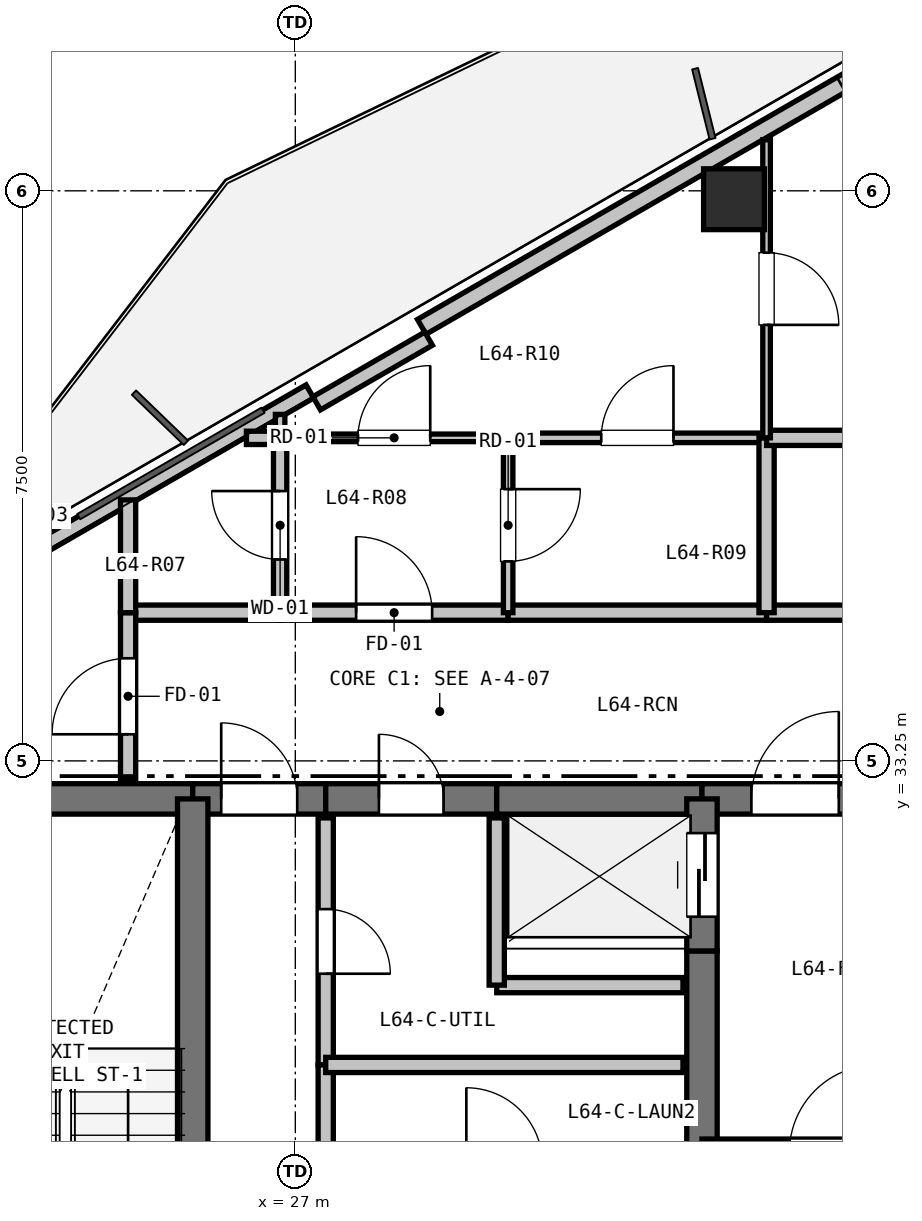
"""IFC4 building model, lengths in metres.
Left out: names, types, materials, properties, quantities, classifications, styles, units other than length and angle.
Written with IfcOpenShell. Run it as: python <this file> out.ifc"""

import sys

from ifc_helpers import new_model, si_unit, direction, frame, frame_2d, origin, origin_2d, place, context, subcontext, project, spatial, rectangle, hollow_rectangle, extrude, element, fill, save


model = new_model("IFC4")
c1 = context("Model", 3, precision=1e-05, world=origin(), true_north=direction((0.0, 1.0)))
c2 = subcontext(c1, "Body", "Model", "MODEL_VIEW")
j1 = project(units=[si_unit("LENGTHUNIT", "METRE"), si_unit("PLANEANGLEUNIT", "RADIAN")], contexts=[c1])
p1 = place(None, origin())
s1 = spatial("IfcSite", under=j1, at=p1, CompositionType="ELEMENT")
p2 = place(p1, origin())
s2 = spatial("IfcBuilding", under=s1, at=p2, CompositionType="ELEMENT")
p3 = place(p2, frame((0.0, 0.0, 229.8)))
s3 = spatial("IfcBuildingStorey", under=s2, at=p3, CompositionType="ELEMENT", Elevation=229.8)
p4 = place(p3, frame((32.771, 40.639, 0.0), z_axis=(0.0, 0.0, 1.0), x_axis=(1.0, 0.0, 0.0)))
e1 = element("IfcColumn", 1, at=p4, inside=s3, PredefinedType="COLUMN", context=c2, shape_type="SweptSolid", body=[
    extrude(hollow_rectangle(XDim=0.8, YDim=0.8, WallThickness=0.025, at=origin_2d()), origin(), (0.0, 0.0, 1.0), 3.3),
])
p5 = place(p3, frame((20.066, 33.997, 0.0), z_axis=(0.0, 0.0, 1.0), x_axis=(0.866019557082, 0.500010126649, 0.0)))
e2 = element("IfcWall", 2, at=p5, inside=s3, PredefinedType="PARAPET", context=c2, shape_type="SweptSolid", body=[
    extrude(rectangle(XDim=8.228, YDim=0.2, at=frame_2d((4.114, 0.0))), origin(), (0.0, 0.0, 1.0), 0.2),
])
p6 = place(p3, frame((28.664, 38.96, 0.0), z_axis=(0.0, 0.0, 1.0), x_axis=(0.866026655105, 0.499997832642, 0.0)))
e3 = element("IfcWall", 3, at=p6, inside=s3, PredefinedType="SOLIDWALL", context=c2, shape_type="SweptSolid", body=[
    extrude(rectangle(XDim=8.928, YDim=0.225, at=frame_2d((4.464, 0.0))), origin(), (0.0, 0.0, 1.0), 2.7),
])
p7 = place(p6, frame((6.372, 0.0, 0.9)))
e4 = element("IfcOpeningElement", 4, at=p7, cuts=e3, PredefinedType="OPENING", context=c2, shape_type="SweptSolid", body=[
    extrude(rectangle(XDim=1.2, YDim=1.4, at=frame_2d((0.6, 0.7))), frame((0.0, 0.123, 0.0), z_axis=(0.0, -1.0, 0.0), x_axis=(1.0, 0.0, 0.0)), (0.0, 0.0, 1.0), 0.245),
])
p8 = place(p3, frame((27.281, 37.955, 0.0), z_axis=(0.0, 0.0, 1.0), x_axis=(0.866025371046, 0.500000056704, 0.0)))
e5 = element("IfcWall", 5, at=p8, inside=s3, PredefinedType="PARAPET", context=c2, shape_type="SweptSolid", body=[
    extrude(rectangle(XDim=1.7, YDim=0.2, at=frame_2d((0.85, 0.0))), origin(), (0.0, 0.0, 1.0), 2.7),
])
p9 = place(p3, frame((22.2, 32.75, 0.0), z_axis=(0.0, 0.0, 1.0), x_axis=(1.0, 0.0, 0.0)))
e6 = element("IfcWall", 6, at=p9, inside=s3, PredefinedType="SHEAR", context=c2, shape_type="SweptSolid", body=[
    extrude(rectangle(XDim=3.45, YDim=0.4, at=frame_2d((1.725, 0.0))), origin(), (0.0, 0.0, 1.0), 3.08),
])
p10 = place(p3, frame((25.65, 32.75, 0.0), z_axis=(0.0, 0.0, 1.0), x_axis=(1.0, 0.0, 0.0)))
e7 = element("IfcWall", 7, at=p10, inside=s3, PredefinedType="SHEAR", context=c2, shape_type="SweptSolid", body=[
    extrude(rectangle(XDim=1.75, YDim=0.4, at=frame_2d((0.875, 0.0))), origin(), (0.0, 0.0, 1.0), 3.08),
])
p11 = place(p10, frame((0.375, 0.0, 0.0)))
e8 = element("IfcOpeningElement", 8, at=p11, cuts=e7, PredefinedType="OPENING", context=c2, shape_type="SweptSolid", body=[
    extrude(rectangle(XDim=1.0, YDim=2.15, at=frame_2d((0.5, 1.075))), frame((0.0, 0.21, 0.0), z_axis=(0.0, -1.0, 0.0), x_axis=(1.0, 0.0, 0.0)), (0.0, 0.0, 1.0), 0.42),
])
p12 = place(p3, frame((27.4, 32.75, 0.0), z_axis=(0.0, 0.0, 1.0), x_axis=(1.0, 0.0, 0.0)))
e9 = element("IfcWall", 9, at=p12, inside=s3, PredefinedType="SHEAR", context=c2, shape_type="SweptSolid", body=[
    extrude(rectangle(XDim=2.25, YDim=0.4, at=frame_2d((1.125, 0.0))), origin(), (0.0, 0.0, 1.0), 3.08),
])
p13 = place(p12, frame((0.7, 0.0, 0.0)))
e10 = element("IfcOpeningElement", 10, at=p13, cuts=e9, PredefinedType="OPENING", context=c2, shape_type="SweptSolid", body=[
    extrude(rectangle(XDim=0.85, YDim=2.1, at=frame_2d((0.425, 1.05))), frame((0.0, 0.21, 0.0), z_axis=(0.0, -1.0, 0.0), x_axis=(1.0, 0.0, 0.0)), (0.0, 0.0, 1.0), 0.42),
])
p14 = place(p3, frame((29.65, 32.75, 0.0), z_axis=(0.0, 0.0, 1.0), x_axis=(1.0, 0.0, 0.0)))
e11 = element("IfcWall", 11, at=p14, inside=s3, PredefinedType="SHEAR", context=c2, shape_type="SweptSolid", body=[
    extrude(rectangle(XDim=2.7, YDim=0.4, at=frame_2d((1.35, 0.0))), origin(), (0.0, 0.0, 1.0), 3.08),
])
p15 = place(p3, frame((32.35, 32.75, 0.0), z_axis=(0.0, 0.0, 1.0), x_axis=(1.0, 0.0, 0.0)))
e12 = element("IfcWall", 12, at=p15, inside=s3, PredefinedType="SHEAR", context=c2, shape_type="SweptSolid", body=[
    extrude(rectangle(XDim=3.45, YDim=0.4, at=frame_2d((1.725, 0.0))), origin(), (0.0, 0.0, 1.0), 3.08),
])
p16 = place(p15, frame((0.65, 0.0, 0.0)))
e13 = element("IfcOpeningElement", 13, at=p16, cuts=e12, PredefinedType="OPENING", context=c2, shape_type="SweptSolid", body=[
    extrude(rectangle(XDim=1.15, YDim=2.15, at=frame_2d((0.575, 1.075))), frame((0.0, 0.21, 0.0), z_axis=(0.0, -1.0, 0.0), x_axis=(1.0, 0.0, 0.0)), (0.0, 0.0, 1.0), 0.42),
])
p17 = place(p3, frame((25.65, 27.95, 0.0), z_axis=(0.0, 0.0, 1.0), x_axis=(0.0, 1.0, 0.0)))
e14 = element("IfcWall", 14, at=p17, inside=s3, PredefinedType="SHEAR", context=c2, shape_type="SweptSolid", body=[
    extrude(rectangle(XDim=4.8, YDim=0.4, at=frame_2d((2.4, 0.0))), origin(), (0.0, 0.0, 1.0), 3.08),
])
p18 = place(p3, frame((32.35, 27.95, 0.0), z_axis=(0.0, 0.0, 1.0), x_axis=(0.0, 1.0, 0.0)))
e15 = element("IfcWall", 15, at=p18, inside=s3, PredefinedType="SHEAR", context=c2, shape_type="SweptSolid", body=[
    extrude(rectangle(XDim=2.8, YDim=0.4, at=frame_2d((1.4, 0.0))), origin(), (0.0, 0.0, 1.0), 3.08),
])
p19 = place(p3, frame((32.35, 30.75, 0.0), z_axis=(0.0, 0.0, 1.0), x_axis=(0.0, 1.0, 0.0)))
e16 = element("IfcWall", 16, at=p19, inside=s3, PredefinedType="SHEAR", context=c2, shape_type="SweptSolid", body=[
    extrude(rectangle(XDim=2.0, YDim=0.4, at=frame_2d((1.0, 0.0))), origin(), (0.0, 0.0, 1.0), 3.08),
])
p20 = place(p19, frame((0.45, 0.0, 0.0)))
e17 = element("IfcOpeningElement", 17, at=p20, cuts=e16, PredefinedType="OPENING", context=c2, shape_type="SweptSolid", body=[
    extrude(rectangle(XDim=1.1, YDim=2.15, at=frame_2d((0.55, 1.075))), frame((0.0, 0.21, 0.0), z_axis=(0.0, -1.0, 0.0), x_axis=(1.0, 0.0, 0.0)), (0.0, 0.0, 1.0), 0.42),
])
p21 = place(p3, frame((32.35, 28.1, 0.0), z_axis=(0.0, 0.0, 1.0), x_axis=(1.0, 0.0, 0.0)))
e18 = element("IfcWall", 18, at=p21, inside=s3, PredefinedType="SHEAR", context=c2, shape_type="SweptSolid", body=[
    extrude(rectangle(XDim=3.45, YDim=0.35, at=frame_2d((1.725, 0.0))), origin(), (0.0, 0.0, 1.0), 3.08),
])
p22 = place(p21, frame((1.15, 0.0, 0.0)))
e19 = element("IfcOpeningElement", 19, at=p22, cuts=e18, PredefinedType="OPENING", context=c2, shape_type="SweptSolid", body=[
    extrude(rectangle(XDim=1.15, YDim=2.15, at=frame_2d((0.575, 1.075))), frame((0.0, 0.185, 0.0), z_axis=(0.0, -1.0, 0.0), x_axis=(1.0, 0.0, 0.0)), (0.0, 0.0, 1.0), 0.37),
])
p23 = place(p3, frame((32.1, 30.3, 0.0), z_axis=(0.0, 0.0, 1.0), x_axis=(-1.0, 0.0, 0.0)))
e20 = element("IfcWall", 20, at=p23, inside=s3, PredefinedType="PARTITIONING", context=c2, shape_type="SweptSolid", body=[
    extrude(rectangle(XDim=2.45, YDim=0.2, at=frame_2d((1.225, 0.0))), origin(), (0.0, 0.0, 1.0), 3.08),
])
p24 = place(p3, frame((29.65, 30.3, 0.0), z_axis=(0.0, 0.0, 1.0), x_axis=(0.0, 1.0, 0.0)))
e21 = element("IfcWall", 21, at=p24, inside=s3, PredefinedType="PARTITIONING", context=c2, shape_type="SweptSolid", body=[
    extrude(rectangle(XDim=2.2, YDim=0.2, at=frame_2d((1.1, 0.0))), origin(), (0.0, 0.0, 1.0), 3.08),
])
p25 = place(p3, frame((27.4, 32.5, 0.0), z_axis=(0.0, 0.0, 1.0), x_axis=(0.0, -1.0, 0.0)))
e22 = element("IfcWall", 22, at=p25, inside=s3, PredefinedType="PARTITIONING", context=c2, shape_type="SweptSolid", body=[
    extrude(rectangle(XDim=3.25, YDim=0.2, at=frame_2d((1.625, 0.0))), origin(), (0.0, 0.0, 1.0), 3.08),
])
p26 = place(p25, frame((1.2, 0.0, 0.0)))
e23 = element("IfcOpeningElement", 23, at=p26, cuts=e22, PredefinedType="OPENING", context=c2, shape_type="SweptSolid", body=[
    extrude(rectangle(XDim=0.85, YDim=2.1, at=frame_2d((0.425, 1.05))), frame((0.0, 0.11, 0.0), z_axis=(0.0, -1.0, 0.0), x_axis=(1.0, 0.0, 0.0)), (0.0, 0.0, 1.0), 0.22),
])
p27 = place(p3, frame((27.4, 29.25, 0.0), z_axis=(0.0, 0.0, 1.0), x_axis=(0.0, -1.0, 0.0)))
e24 = element("IfcWall", 24, at=p27, inside=s3, PredefinedType="PARTITIONING", context=c2, shape_type="SweptSolid", body=[
    extrude(rectangle(XDim=1.3, YDim=0.2, at=frame_2d((0.65, 0.0))), origin(), (0.0, 0.0, 1.0), 3.08),
])
p28 = place(p3, frame((24.8, 35.2, 0.0), z_axis=(0.0, 0.0, 1.0), x_axis=(1.0, 0.0, 0.0)))
e25 = element("IfcWall", 25, at=p28, inside=s3, PredefinedType="PARTITIONING", context=c2, shape_type="SweptSolid", body=[
    extrude(rectangle(XDim=2.0, YDim=0.2, at=frame_2d((1.0, 0.0))), origin(), (0.0, 0.0, 1.0), 3.08),
])
p29 = place(p3, frame((26.8, 35.2, 0.0), z_axis=(0.0, 0.0, 1.0), x_axis=(1.0, 0.0, 0.0)))
e26 = element("IfcWall", 26, at=p29, inside=s3, PredefinedType="PARTITIONING", context=c2, shape_type="SweptSolid", body=[
    extrude(rectangle(XDim=3.0, YDim=0.2, at=frame_2d((1.5, 0.0))), origin(), (0.0, 0.0, 1.0), 3.08),
])
p30 = place(p29, frame((1.0, 0.0, 0.0)))
e27 = element("IfcOpeningElement", 27, at=p30, cuts=e26, PredefinedType="OPENING", context=c2, shape_type="SweptSolid", body=[
    extrude(rectangle(XDim=1.0, YDim=2.15, at=frame_2d((0.5, 1.075))), frame((0.0, 0.11, 0.0), z_axis=(0.0, -1.0, 0.0), x_axis=(1.0, 0.0, 0.0)), (0.0, 0.0, 1.0), 0.22),
])
p31 = place(p3, frame((29.8, 35.2, 0.0), z_axis=(0.0, 0.0, 1.0), x_axis=(1.0, 0.0, 0.0)))
e28 = element("IfcWall", 28, at=p31, inside=s3, PredefinedType="PARTITIONING", context=c2, shape_type="SweptSolid", body=[
    extrude(rectangle(XDim=3.4, YDim=0.2, at=frame_2d((1.7, 0.0))), origin(), (0.0, 0.0, 1.0), 3.08),
])
p32 = place(p3, frame((33.2, 35.2, 0.0), z_axis=(0.0, 0.0, 1.0), x_axis=(1.0, 0.0, 0.0)))
e29 = element("IfcWall", 29, at=p32, inside=s3, PredefinedType="PARTITIONING", context=c2, shape_type="SweptSolid", body=[
    extrude(rectangle(XDim=5.0, YDim=0.2, at=frame_2d((2.5, 0.0))), origin(), (0.0, 0.0, 1.0), 2.528),
])
p33 = place(p32, frame((2.075, 0.0, 0.0)))
e30 = element("IfcOpeningElement", 30, at=p33, cuts=e29, PredefinedType="OPENING", context=c2, shape_type="SweptSolid", body=[
    extrude(rectangle(XDim=0.85, YDim=2.1, at=frame_2d((0.425, 1.05))), frame((0.0, 0.11, 0.0), z_axis=(0.0, -1.0, 0.0), x_axis=(1.0, 0.0, 0.0)), (0.0, 0.0, 1.0), 0.22),
])
p34 = place(p3, frame((24.8, 33.0, 0.0), z_axis=(0.0, 0.0, 1.0), x_axis=(0.0, 1.0, 0.0)))
e31 = element("IfcWall", 31, at=p34, inside=s3, PredefinedType="PARTITIONING", context=c2, shape_type="SweptSolid", body=[
    extrude(rectangle(XDim=2.2, YDim=0.2, at=frame_2d((1.1, 0.0))), origin(), (0.0, 0.0, 1.0), 2.605),
])
p35 = place(p34, frame((0.6, 0.0, 0.0)))
e32 = element("IfcOpeningElement", 32, at=p35, cuts=e31, PredefinedType="OPENING", context=c2, shape_type="SweptSolid", body=[
    extrude(rectangle(XDim=1.0, YDim=2.15, at=frame_2d((0.5, 1.075))), frame((0.0, 0.11, 0.0), z_axis=(0.0, -1.0, 0.0), x_axis=(1.0, 0.0, 0.0)), (0.0, 0.0, 1.0), 0.22),
])
p36 = place(p3, frame((26.8, 37.5, 0.0), z_axis=(0.0, 0.0, 1.0), x_axis=(1.0, 0.0, 0.0)))
e33 = element("IfcWall", 33, at=p36, inside=s3, PredefinedType="PARTITIONING", context=c2, shape_type="SweptSolid", body=[
    extrude(rectangle(XDim=3.0, YDim=0.1, at=frame_2d((1.5, 0.0))), origin(), (0.0, 0.0, 1.0), 2.365),
])
p37 = place(p36, frame((1.025, 0.0, 0.0)))
e34 = element("IfcOpeningElement", 34, at=p37, cuts=e33, PredefinedType="OPENING", context=c2, shape_type="SweptSolid", body=[
    extrude(rectangle(XDim=0.95, YDim=2.1, at=frame_2d((0.475, 1.05))), frame((0.0, 0.06, 0.0), z_axis=(0.0, -1.0, 0.0), x_axis=(1.0, 0.0, 0.0)), (0.0, 0.0, 1.0), 0.12),
])
p38 = place(p3, frame((29.8, 37.5, 0.0), z_axis=(0.0, 0.0, 1.0), x_axis=(0.0, -1.0, 0.0)))
e35 = element("IfcWall", 35, at=p38, inside=s3, PredefinedType="PARTITIONING", context=c2, shape_type="SweptSolid", body=[
    extrude(rectangle(XDim=2.3, YDim=0.125, at=frame_2d((1.15, 0.0))), origin(), (0.0, 0.0, 1.0), 3.08),
])
p39 = place(p38, frame((0.675, 0.0, 0.0)))
e36 = element("IfcOpeningElement", 36, at=p39, cuts=e35, PredefinedType="OPENING", context=c2, shape_type="SweptSolid", body=[
    extrude(rectangle(XDim=0.95, YDim=2.1, at=frame_2d((0.475, 1.05))), frame((0.0, 0.073, 0.0), z_axis=(0.0, -1.0, 0.0), x_axis=(1.0, 0.0, 0.0)), (0.0, 0.0, 1.0), 0.145),
])
p40 = place(p3, frame((26.8, 35.2, 0.0), z_axis=(0.0, 0.0, 1.0), x_axis=(0.0, 1.0, 0.0)))
e37 = element("IfcWall", 37, at=p40, inside=s3, PredefinedType="PLUMBINGWALL", context=c2, shape_type="SweptSolid", body=[
    extrude(rectangle(XDim=2.3, YDim=0.175, at=frame_2d((1.15, 0.0))), origin(), (0.0, 0.0, 1.0), 2.365),
])
p41 = place(p40, frame((0.7, 0.0, 0.0)))
e38 = element("IfcOpeningElement", 38, at=p41, cuts=e37, PredefinedType="OPENING", context=c2, shape_type="SweptSolid", body=[
    extrude(rectangle(XDim=0.9, YDim=2.1, at=frame_2d((0.45, 1.05))), frame((0.0, 0.097, 0.0), z_axis=(0.0, -1.0, 0.0), x_axis=(1.0, 0.0, 0.0)), (0.0, 0.0, 1.0), 0.195),
])
p42 = place(p3, frame((24.8, 35.2, 0.0), z_axis=(0.0, 0.0, 1.0), x_axis=(0.0, 1.0, 0.0)))
e39 = element("IfcWall", 39, at=p42, inside=s3, PredefinedType="PARTITIONING", context=c2, shape_type="SweptSolid", body=[
    extrude(rectangle(XDim=1.484, YDim=0.2, at=frame_2d((0.742, 0.0))), origin(), (0.0, 0.0, 1.0), 2.365),
])
p43 = place(p3, frame((26.357, 37.5, 0.0), z_axis=(0.0, 0.0, 1.0), x_axis=(1.0, 0.0, 0.0)))
e40 = element("IfcWall", 40, at=p43, inside=s3, PredefinedType="PLUMBINGWALL", context=c2, shape_type="SweptSolid", body=[
    extrude(rectangle(XDim=0.428, YDim=0.175, at=frame_2d((0.214, 0.0))), origin(), (0.0, 0.0, 1.0), 3.08),
])
p44 = place(p3, frame((29.8, 37.5, 0.0), z_axis=(0.0, 0.0, 1.0), x_axis=(1.0, 0.0, 0.0)))
e41 = element("IfcWall", 41, at=p44, inside=s3, PredefinedType="PARTITIONING", context=c2, shape_type="SweptSolid", body=[
    extrude(rectangle(XDim=3.4, YDim=0.125, at=frame_2d((1.7, 0.0))), origin(), (0.0, 0.0, 1.0), 3.08),
])
p45 = place(p44, frame((1.225, 0.0, 0.0)))
e42 = element("IfcOpeningElement", 42, at=p45, cuts=e41, PredefinedType="OPENING", context=c2, shape_type="SweptSolid", body=[
    extrude(rectangle(XDim=0.95, YDim=2.1, at=frame_2d((0.475, 1.05))), frame((0.0, 0.073, 0.0), z_axis=(0.0, -1.0, 0.0), x_axis=(1.0, 0.0, 0.0)), (0.0, 0.0, 1.0), 0.145),
])
p46 = place(p3, frame((33.2, 37.5, 0.0), z_axis=(0.0, 0.0, 1.0), x_axis=(0.0, -1.0, 0.0)))
e43 = element("IfcWall", 43, at=p46, inside=s3, PredefinedType="PARTITIONING", context=c2, shape_type="SweptSolid", body=[
    extrude(rectangle(XDim=2.3, YDim=0.2, at=frame_2d((1.15, 0.0))), origin(), (0.0, 0.0, 1.0), 3.08),
])
p47 = place(p3, frame((32.1, 29.25, 0.0), z_axis=(0.0, 0.0, 1.0), x_axis=(-1.0, 0.0, 0.0)))
e44 = element("IfcWall", 44, at=p47, inside=s3, PredefinedType="PARTITIONING", context=c2, shape_type="SweptSolid", body=[
    extrude(rectangle(XDim=4.7, YDim=0.2, at=frame_2d((2.35, 0.0))), origin(), (0.0, 0.0, 1.0), 3.08),
])
p48 = place(p3, frame((33.2, 37.5, 0.0), z_axis=(0.0, 0.0, 1.0), x_axis=(1.0, 0.0, 0.0)))
e45 = element("IfcWall", 45, at=p48, inside=s3, PredefinedType="PARTITIONING", context=c2, shape_type="SweptSolid", body=[
    extrude(rectangle(XDim=6.406, YDim=0.2, at=frame_2d((3.203, 0.0))), origin(), (0.0, 0.0, 1.0), 2.528),
])
p49 = place(p3, frame((26.8, 37.5, 0.0), z_axis=(0.0, 0.0, 1.0), x_axis=(0.0, 1.0, 0.0)))
e46 = element("IfcWall", 46, at=p49, inside=s3, PredefinedType="PARTITIONING", context=c2, shape_type="SweptSolid", body=[
    extrude(rectangle(XDim=0.308, YDim=0.125, at=frame_2d((0.154, 0.0))), origin(), (0.0, 0.0, 1.0), 3.08),
])
p50 = place(p3, frame((33.2, 41.422, 0.0), z_axis=(0.0, 0.0, 1.0), x_axis=(0.0, -1.0, 0.0)))
e47 = element("IfcWall", 47, at=p50, inside=s3, PredefinedType="PARTITIONING", context=c2, shape_type="SweptSolid", body=[
    extrude(rectangle(XDim=3.922, YDim=0.1, at=frame_2d((1.961, 0.0))), origin(), (0.0, 0.0, 1.0), 2.805),
])
p51 = place(p50, frame((1.486, 0.0, 0.0)))
e48 = element("IfcOpeningElement", 48, at=p51, cuts=e47, PredefinedType="OPENING", context=c2, shape_type="SweptSolid", body=[
    extrude(rectangle(XDim=0.95, YDim=2.1, at=frame_2d((0.475, 1.05))), frame((0.0, 0.06, 0.0), z_axis=(0.0, -1.0, 0.0), x_axis=(1.0, 0.0, 0.0)), (0.0, 0.0, 1.0), 0.12),
])
p52 = place(p7, origin())
e49 = element("IfcWindow", 49, at=p52, inside=s3, PartitioningType="SINGLE_PANEL", PredefinedType="WINDOW", context=c2, shape_type="SweptSolid", body=[
    extrude(rectangle(XDim=1.2, YDim=1.4, at=frame_2d((0.6, 0.7))), frame((0.0, 0.03, 0.0), z_axis=(0.0, -1.0, 0.0), x_axis=(1.0, 0.0, 0.0)), (0.0, 0.0, 1.0), 0.06),
])
fill(e4, e49)
p53 = place(p11, origin())
e50 = element("IfcDoor", 50, at=p53, inside=s3, OperationType="SINGLE_SWING_LEFT", PredefinedType="DOOR", context=c2, shape_type="SweptSolid", body=[
    extrude(rectangle(XDim=1.0, YDim=2.15, at=frame_2d((0.5, 1.075))), frame((0.0, 0.025, 0.0), z_axis=(0.0, -1.0, 0.0), x_axis=(1.0, 0.0, 0.0)), (0.0, 0.0, 1.0), 0.05),
])
fill(e8, e50)
p54 = place(p20, origin())
e51 = element("IfcDoor", 51, at=p54, inside=s3, OperationType="SLIDING_TO_LEFT", PredefinedType="DOOR", context=c2, shape_type="SweptSolid", body=[
    extrude(rectangle(XDim=1.1, YDim=2.15, at=frame_2d((0.55, 1.075))), frame((0.0, 0.025, 0.0), z_axis=(0.0, -1.0, 0.0), x_axis=(1.0, 0.0, 0.0)), (0.0, 0.0, 1.0), 0.05),
])
fill(e17, e51)
p55 = place(p16, origin())
e52 = element("IfcDoor", 52, at=p55, inside=s3, OperationType="SINGLE_SWING_RIGHT", PredefinedType="DOOR", context=c2, shape_type="SweptSolid", body=[
    extrude(rectangle(XDim=1.15, YDim=2.15, at=frame_2d((0.575, 1.075))), frame((0.0, 0.025, 0.0), z_axis=(0.0, -1.0, 0.0), x_axis=(1.0, 0.0, 0.0)), (0.0, 0.0, 1.0), 0.05),
])
fill(e13, e52)
p56 = place(p26, origin())
e53 = element("IfcDoor", 53, at=p56, inside=s3, OperationType="SINGLE_SWING_RIGHT", PredefinedType="DOOR", context=c2, shape_type="SweptSolid", body=[
    extrude(rectangle(XDim=0.85, YDim=2.1, at=frame_2d((0.425, 1.05))), frame((0.0, 0.025, 0.0), z_axis=(0.0, -1.0, 0.0), x_axis=(1.0, 0.0, 0.0)), (0.0, 0.0, 1.0), 0.05),
])
fill(e23, e53)
p57 = place(p30, origin())
e54 = element("IfcDoor", 54, at=p57, inside=s3, OperationType="SINGLE_SWING_LEFT", PredefinedType="DOOR", context=c2, shape_type="SweptSolid", body=[
    extrude(rectangle(XDim=1.0, YDim=2.15, at=frame_2d((0.5, 1.075))), frame((0.0, 0.025, 0.0), z_axis=(0.0, -1.0, 0.0), x_axis=(1.0, 0.0, 0.0)), (0.0, 0.0, 1.0), 0.05),
])
fill(e27, e54)
p58 = place(p13, origin())
e55 = element("IfcDoor", 55, at=p58, inside=s3, OperationType="SINGLE_SWING_LEFT", PredefinedType="DOOR", context=c2, shape_type="SweptSolid", body=[
    extrude(rectangle(XDim=0.85, YDim=2.1, at=frame_2d((0.425, 1.05))), frame((0.0, 0.025, 0.0), z_axis=(0.0, -1.0, 0.0), x_axis=(1.0, 0.0, 0.0)), (0.0, 0.0, 1.0), 0.05),
])
fill(e10, e55)
p59 = place(p35, origin())
e56 = element("IfcDoor", 56, at=p59, inside=s3, OperationType="SINGLE_SWING_LEFT", PredefinedType="DOOR", context=c2, shape_type="SweptSolid", body=[
    extrude(rectangle(XDim=1.0, YDim=2.15, at=frame_2d((0.5, 1.075))), frame((0.0, 0.025, 0.0), z_axis=(0.0, -1.0, 0.0), x_axis=(1.0, 0.0, 0.0)), (0.0, 0.0, 1.0), 0.05),
])
fill(e32, e56)
p60 = place(p41, origin())
e57 = element("IfcDoor", 57, at=p60, inside=s3, OperationType="SINGLE_SWING_RIGHT", PredefinedType="DOOR", context=c2, shape_type="SweptSolid", body=[
    extrude(rectangle(XDim=0.9, YDim=2.1, at=frame_2d((0.45, 1.05))), frame((0.0, 0.025, 0.0), z_axis=(0.0, -1.0, 0.0), x_axis=(1.0, 0.0, 0.0)), (0.0, 0.0, 1.0), 0.05),
])
fill(e38, e57)
p61 = place(p39, origin())
e58 = element("IfcDoor", 58, at=p61, inside=s3, OperationType="SINGLE_SWING_LEFT", PredefinedType="DOOR", context=c2, shape_type="SweptSolid", body=[
    extrude(rectangle(XDim=0.95, YDim=2.1, at=frame_2d((0.475, 1.05))), frame((0.0, 0.025, 0.0), z_axis=(0.0, -1.0, 0.0), x_axis=(1.0, 0.0, 0.0)), (0.0, 0.0, 1.0), 0.05),
])
fill(e36, e58)
p62 = place(p37, origin())
e59 = element("IfcDoor", 59, at=p62, inside=s3, OperationType="SINGLE_SWING_RIGHT", PredefinedType="DOOR", context=c2, shape_type="SweptSolid", body=[
    extrude(rectangle(XDim=0.95, YDim=2.1, at=frame_2d((0.475, 1.05))), frame((0.0, 0.025, 0.0), z_axis=(0.0, -1.0, 0.0), x_axis=(1.0, 0.0, 0.0)), (0.0, 0.0, 1.0), 0.05),
])
fill(e34, e59)
p63 = place(p45, origin())
e60 = element("IfcDoor", 60, at=p63, inside=s3, OperationType="SINGLE_SWING_RIGHT", PredefinedType="DOOR", context=c2, shape_type="SweptSolid", body=[
    extrude(rectangle(XDim=0.95, YDim=2.1, at=frame_2d((0.475, 1.05))), frame((0.0, 0.025, 0.0), z_axis=(0.0, -1.0, 0.0), x_axis=(1.0, 0.0, 0.0)), (0.0, 0.0, 1.0), 0.05),
])
fill(e42, e60)
p64 = place(p51, origin())
e61 = element("IfcDoor", 61, at=p64, inside=s3, OperationType="SINGLE_SWING_RIGHT", PredefinedType="DOOR", context=c2, shape_type="SweptSolid", body=[
    extrude(rectangle(XDim=0.95, YDim=2.1, at=frame_2d((0.475, 1.05))), frame((0.0, 0.025, 0.0), z_axis=(0.0, -1.0, 0.0), x_axis=(1.0, 0.0, 0.0)), (0.0, 0.0, 1.0), 0.05),
])
fill(e48, e61)
save(model, sys.argv[1])
